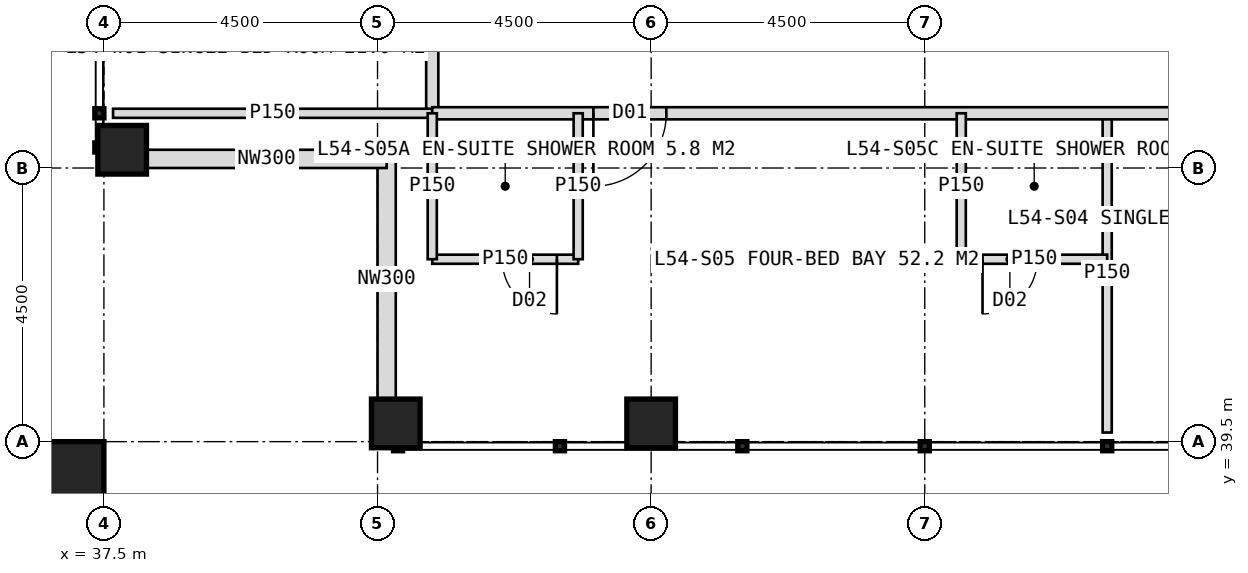
"""IFC4 building model, lengths in metres.
Left out: names, types, materials, properties, quantities, classifications, styles, units other than length and angle.
Written with IfcOpenShell. Run it as: python <this file> out.ifc"""

import sys

from ifc_helpers import new_model, si_unit, direction, frame, frame_2d, origin, origin_2d, place, context, subcontext, project, spatial, rectangle, hollow_rectangle, extrude, element, fill, save


model = new_model("IFC4")
c1 = context("Model", 3, precision=1e-05, world=origin(), true_north=direction((0.0, 1.0)))
c2 = subcontext(c1, "Body", "Model", "MODEL_VIEW")
j1 = project(units=[si_unit("LENGTHUNIT", "METRE"), si_unit("PLANEANGLEUNIT", "RADIAN")], contexts=[c1])
p1 = place(None, origin())
s1 = spatial("IfcSite", under=j1, at=p1, CompositionType="ELEMENT")
p2 = place(p1, origin())
s2 = spatial("IfcBuilding", under=s1, at=p2, CompositionType="ELEMENT")
p3 = place(p2, frame((0.0, 0.0, 225.0)))
s3 = spatial("IfcBuildingStorey", under=s2, at=p3, CompositionType="ELEMENT", Elevation=225.0)
for number, where, z_axis, x_axis in (
    (1, (42.3, 39.8, 0.0), (0.0, 0.0, 1.0), (1.0, 0.0, 0.0)),
    (2, (37.8, 44.3, 0.0), (0.0, 0.0, 1.0), (1.0, 0.0, 0.0)),
    (3, (46.5, 39.8, 0.0), (0.0, 0.0, 1.0), (1.0, 0.0, 0.0)),
):
    element("IfcColumn", number, at=place(p3, frame(where, z_axis=z_axis, x_axis=x_axis)), inside=s3, PredefinedType="COLUMN", context=c2, shape_type="SweptSolid", body=[
        extrude(hollow_rectangle(XDim=0.8, YDim=0.8, WallThickness=0.08, at=origin_2d()), origin(), (0.0, 0.0, 1.0), 4.0),
    ])
p4 = place(p3, frame((36.9, 38.9, 0.0), z_axis=(0.0, 0.0, 1.0), x_axis=(1.0, 0.0, 0.0)))
e4 = element("IfcColumn", 4, at=p4, inside=s3, PredefinedType="COLUMN", context=c2, shape_type="SweptSolid", body=[
    extrude(hollow_rectangle(XDim=1.2, YDim=1.2, WallThickness=0.07, at=origin_2d()), origin(), (0.0, 0.0, 1.0), 4.0),
])
for number, where, z_axis, x_axis in (
    (5, (42.15, 40.2, 0.0), (0.0, 0.0, 1.0), (0.0, 1.0, 0.0)),
    (6, (42.15, 44.15, 0.0), (0.0, 0.0, 1.0), (-1.0, 0.0, 0.0)),
):
    element("IfcWall", number, at=place(p3, frame(where, z_axis=z_axis, x_axis=x_axis)), inside=s3, PredefinedType="ELEMENTEDWALL", context=c2, shape_type="SweptSolid", body=[
        extrude(rectangle(XDim=3.95, YDim=0.3, at=frame_2d((1.975, 0.0))), origin(), (0.0, 0.0, 1.0), 2.85),
    ])
p5 = place(p3, frame((42.9, 44.9, 0.0), z_axis=(0.0, 0.0, 1.0), x_axis=(0.0, 1.0, 0.0)))
e7 = element("IfcWall", 7, at=p5, inside=s3, PredefinedType="PARTITIONING", context=c2, shape_type="SweptSolid", body=[
    extrude(rectangle(XDim=34.2, YDim=0.2, at=frame_2d((17.1, 0.0))), origin(), (0.0, 0.0, 1.0), 3.75),
])
p6 = place(p5, frame((1.25, 0.0, 0.0)))
e8 = element("IfcOpeningElement", 8, at=p6, cuts=e7, PredefinedType="OPENING", context=c2, shape_type="SweptSolid", body=[
    extrude(rectangle(XDim=1.2, YDim=2.2, at=frame_2d((0.6, 1.1))), frame((0.0, 0.11, 0.0), z_axis=(0.0, -1.0, 0.0), x_axis=(1.0, 0.0, 0.0)), (0.0, 0.0, 1.0), 0.22),
])
p7 = place(p5, frame((7.75, 0.0, 0.0)))
e9 = element("IfcOpeningElement", 9, at=p7, cuts=e7, PredefinedType="OPENING", context=c2, shape_type="SweptSolid", body=[
    extrude(rectangle(XDim=1.2, YDim=2.2, at=frame_2d((0.6, 1.1))), frame((0.0, 0.11, 0.0), z_axis=(0.0, -1.0, 0.0), x_axis=(1.0, 0.0, 0.0)), (0.0, 0.0, 1.0), 0.22),
])
p8 = place(p5, frame((13.6, 0.0, 0.0)))
e10 = element("IfcOpeningElement", 10, at=p8, cuts=e7, PredefinedType="OPENING", context=c2, shape_type="SweptSolid", body=[
    extrude(rectangle(XDim=1.0, YDim=2.1, at=frame_2d((0.5, 1.05))), frame((0.0, 0.11, 0.0), z_axis=(0.0, -1.0, 0.0), x_axis=(1.0, 0.0, 0.0)), (0.0, 0.0, 1.0), 0.22),
])
p9 = place(p5, frame((19.75, 0.0, 0.0)))
e11 = element("IfcOpeningElement", 11, at=p9, cuts=e7, PredefinedType="OPENING", context=c2, shape_type="SweptSolid", body=[
    extrude(rectangle(XDim=1.2, YDim=2.2, at=frame_2d((0.6, 1.1))), frame((0.0, 0.11, 0.0), z_axis=(0.0, -1.0, 0.0), x_axis=(1.0, 0.0, 0.0)), (0.0, 0.0, 1.0), 0.22),
])
p10 = place(p5, frame((30.35, 0.0, 0.0)))
e12 = element("IfcOpeningElement", 12, at=p10, cuts=e7, PredefinedType="OPENING", context=c2, shape_type="SweptSolid", body=[
    extrude(rectangle(XDim=1.2, YDim=2.2, at=frame_2d((0.6, 1.1))), frame((0.0, 0.11, 0.0), z_axis=(0.0, -1.0, 0.0), x_axis=(1.0, 0.0, 0.0)), (0.0, 0.0, 1.0), 0.22),
])
for number, where, z_axis, x_axis in (
    (13, (42.9, 44.9, 0.0), (0.0, 0.0, 1.0), (-1.0, 0.0, 0.0)),
    (14, (54.0, 44.9, 0.0), (0.0, 0.0, 1.0), (0.0, -1.0, 0.0)),
):
    element("IfcWall", number, at=place(p3, frame(where, z_axis=z_axis, x_axis=x_axis)), inside=s3, PredefinedType="PARTITIONING", context=c2, shape_type="SweptSolid", body=[
        extrude(rectangle(XDim=5.25, YDim=0.15, at=frame_2d((2.625, 0.0))), origin(), (0.0, 0.0, 1.0), 3.75),
    ])
p11 = place(p3, frame((77.1, 44.9, 0.0), z_axis=(0.0, 0.0, 1.0), x_axis=(-1.0, 0.0, 0.0)))
e15 = element("IfcWall", 15, at=p11, inside=s3, PredefinedType="PARTITIONING", context=c2, shape_type="SweptSolid", body=[
    extrude(rectangle(XDim=34.2, YDim=0.2, at=frame_2d((17.1, 0.0))), origin(), (0.0, 0.0, 1.0), 3.75),
])
p12 = place(p11, frame((1.25, 0.0, 0.0)))
e16 = element("IfcOpeningElement", 16, at=p12, cuts=e15, PredefinedType="OPENING", context=c2, shape_type="SweptSolid", body=[
    extrude(rectangle(XDim=1.2, YDim=2.2, at=frame_2d((0.6, 1.1))), frame((0.0, 0.11, 0.0), z_axis=(0.0, -1.0, 0.0), x_axis=(1.0, 0.0, 0.0)), (0.0, 0.0, 1.0), 0.22),
])
p13 = place(p11, frame((7.75, 0.0, 0.0)))
e17 = element("IfcOpeningElement", 17, at=p13, cuts=e15, PredefinedType="OPENING", context=c2, shape_type="SweptSolid", body=[
    extrude(rectangle(XDim=1.2, YDim=2.2, at=frame_2d((0.6, 1.1))), frame((0.0, 0.11, 0.0), z_axis=(0.0, -1.0, 0.0), x_axis=(1.0, 0.0, 0.0)), (0.0, 0.0, 1.0), 0.22),
])
p14 = place(p11, frame((13.25, 0.0, 0.0)))
e18 = element("IfcOpeningElement", 18, at=p14, cuts=e15, PredefinedType="OPENING", context=c2, shape_type="SweptSolid", body=[
    extrude(rectangle(XDim=1.2, YDim=2.2, at=frame_2d((0.6, 1.1))), frame((0.0, 0.11, 0.0), z_axis=(0.0, -1.0, 0.0), x_axis=(1.0, 0.0, 0.0)), (0.0, 0.0, 1.0), 0.22),
])
p15 = place(p11, frame((19.75, 0.0, 0.0)))
e19 = element("IfcOpeningElement", 19, at=p15, cuts=e15, PredefinedType="OPENING", context=c2, shape_type="SweptSolid", body=[
    extrude(rectangle(XDim=1.2, YDim=2.2, at=frame_2d((0.6, 1.1))), frame((0.0, 0.11, 0.0), z_axis=(0.0, -1.0, 0.0), x_axis=(1.0, 0.0, 0.0)), (0.0, 0.0, 1.0), 0.22),
])
p16 = place(p11, frame((30.35, 0.0, 0.0)))
e20 = element("IfcOpeningElement", 20, at=p16, cuts=e15, PredefinedType="OPENING", context=c2, shape_type="SweptSolid", body=[
    extrude(rectangle(XDim=1.2, YDim=2.2, at=frame_2d((0.6, 1.1))), frame((0.0, 0.11, 0.0), z_axis=(0.0, -1.0, 0.0), x_axis=(1.0, 0.0, 0.0)), (0.0, 0.0, 1.0), 0.22),
])
p17 = place(p3, frame((45.3, 42.5, 0.0), z_axis=(0.0, 0.0, 1.0), x_axis=(-1.0, 0.0, 0.0)))
e21 = element("IfcWall", 21, at=p17, inside=s3, PredefinedType="PARTITIONING", context=c2, shape_type="SweptSolid", body=[
    extrude(rectangle(XDim=2.4, YDim=0.15, at=frame_2d((1.2, 0.0))), origin(), (0.0, 0.0, 1.0), 3.75),
])
p18 = place(p17, frame((0.35, 0.0, 0.0)))
e22 = element("IfcOpeningElement", 22, at=p18, cuts=e21, PredefinedType="OPENING", context=c2, shape_type="SweptSolid", body=[
    extrude(rectangle(XDim=0.9, YDim=2.1, at=frame_2d((0.45, 1.05))), frame((0.0, 0.085, 0.0), z_axis=(0.0, -1.0, 0.0), x_axis=(1.0, 0.0, 0.0)), (0.0, 0.0, 1.0), 0.17),
])
p19 = place(p3, frame((45.3, 44.9, 0.0), z_axis=(0.0, 0.0, 1.0), x_axis=(0.0, -1.0, 0.0)))
e23 = element("IfcWall", 23, at=p19, inside=s3, PredefinedType="PARTITIONING", context=c2, shape_type="SweptSolid", body=[
    extrude(rectangle(XDim=2.4, YDim=0.15, at=frame_2d((1.2, 0.0))), origin(), (0.0, 0.0, 1.0), 3.75),
])
p20 = place(p3, frame((54.0, 42.5, 0.0), z_axis=(0.0, 0.0, 1.0), x_axis=(-1.0, 0.0, 0.0)))
e24 = element("IfcWall", 24, at=p20, inside=s3, PredefinedType="PARTITIONING", context=c2, shape_type="SweptSolid", body=[
    extrude(rectangle(XDim=2.4, YDim=0.15, at=frame_2d((1.2, 0.0))), origin(), (0.0, 0.0, 1.0), 3.75),
])
p21 = place(p20, frame((1.15, 0.0, 0.0)))
e25 = element("IfcOpeningElement", 25, at=p21, cuts=e24, PredefinedType="OPENING", context=c2, shape_type="SweptSolid", body=[
    extrude(rectangle(XDim=0.9, YDim=2.1, at=frame_2d((0.45, 1.05))), frame((0.0, 0.085, 0.0), z_axis=(0.0, -1.0, 0.0), x_axis=(1.0, 0.0, 0.0)), (0.0, 0.0, 1.0), 0.17),
])
for number, where, z_axis, x_axis in (
    (26, (51.6, 44.9, 0.0), (0.0, 0.0, 1.0), (0.0, -1.0, 0.0)),
    (27, (42.9, 44.9, 0.0), (0.0, 0.0, 1.0), (0.0, -1.0, 0.0)),
):
    element("IfcWall", number, at=place(p3, frame(where, z_axis=z_axis, x_axis=x_axis)), inside=s3, PredefinedType="PARTITIONING", context=c2, shape_type="SweptSolid", body=[
        extrude(rectangle(XDim=2.4, YDim=0.15, at=frame_2d((1.2, 0.0))), origin(), (0.0, 0.0, 1.0), 3.75),
    ])
p22 = place(p16, origin())
e28 = element("IfcDoor", 28, at=p22, inside=s3, OperationType="SINGLE_SWING_RIGHT", PredefinedType="DOOR", context=c2, shape_type="SweptSolid", body=[
    extrude(rectangle(XDim=1.2, YDim=2.2, at=frame_2d((0.6, 1.1))), frame((0.0, 0.025, 0.0), z_axis=(0.0, -1.0, 0.0), x_axis=(1.0, 0.0, 0.0)), (0.0, 0.0, 1.0), 0.05),
])
fill(e20, e28)
p23 = place(p18, origin())
e29 = element("IfcDoor", 29, at=p23, inside=s3, OperationType="SINGLE_SWING_LEFT", PredefinedType="DOOR", context=c2, shape_type="SweptSolid", body=[
    extrude(rectangle(XDim=0.9, YDim=2.1, at=frame_2d((0.45, 1.05))), frame((0.0, 0.025, 0.0), z_axis=(0.0, -1.0, 0.0), x_axis=(1.0, 0.0, 0.0)), (0.0, 0.0, 1.0), 0.05),
])
fill(e22, e29)
p24 = place(p21, origin())
e30 = element("IfcDoor", 30, at=p24, inside=s3, OperationType="SINGLE_SWING_RIGHT", PredefinedType="DOOR", context=c2, shape_type="SweptSolid", body=[
    extrude(rectangle(XDim=0.9, YDim=2.1, at=frame_2d((0.45, 1.05))), frame((0.0, 0.025, 0.0), z_axis=(0.0, -1.0, 0.0), x_axis=(1.0, 0.0, 0.0)), (0.0, 0.0, 1.0), 0.05),
])
fill(e25, e30)
save(model, sys.argv[1])
